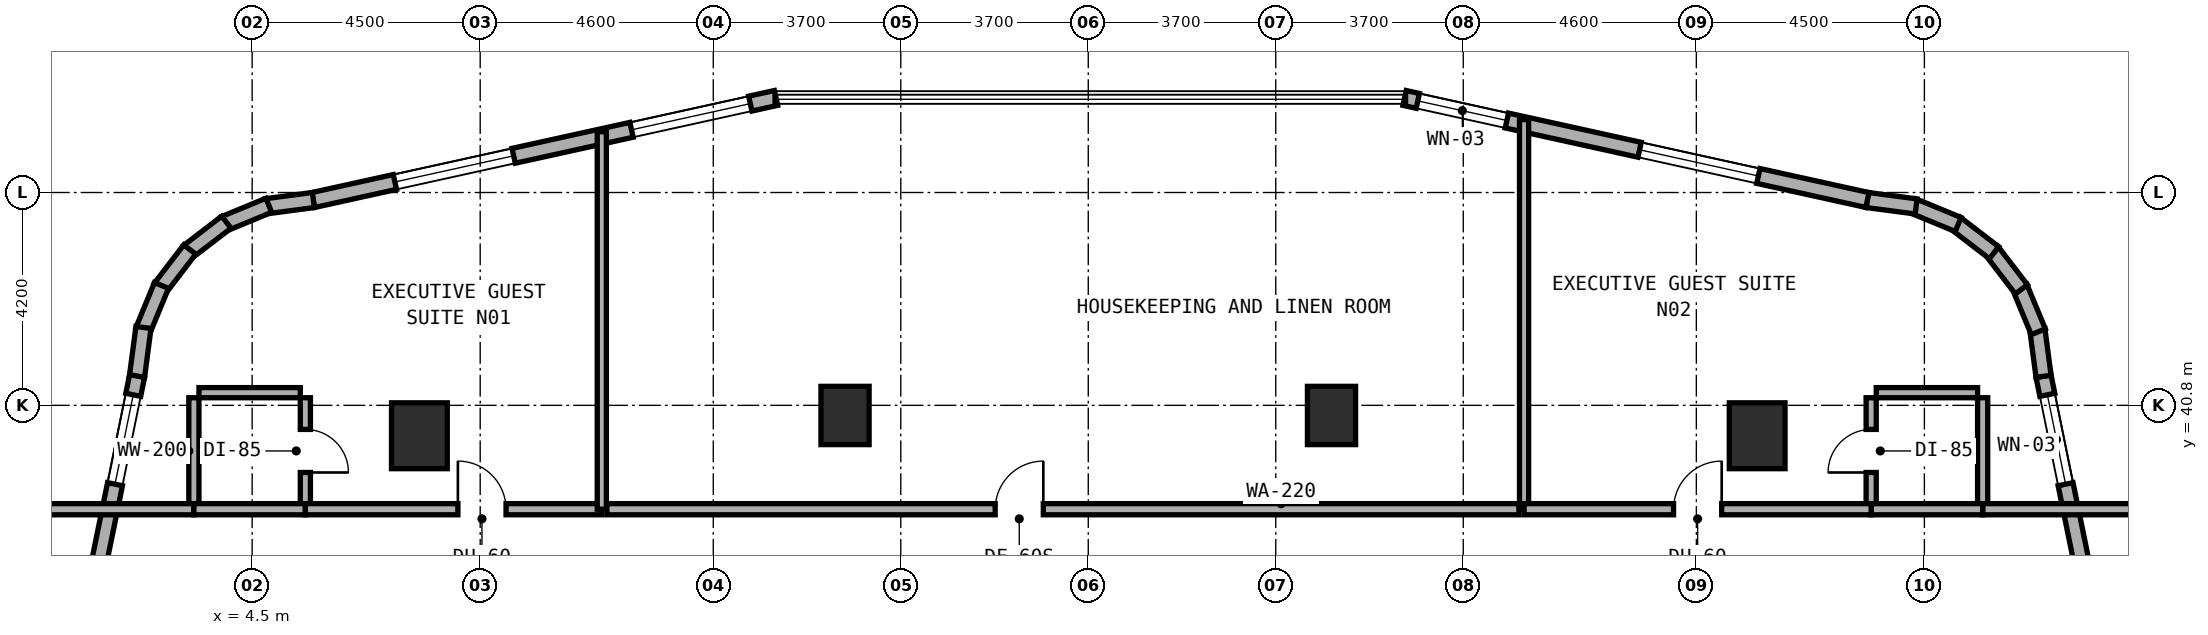
"""IFC4 building model, lengths in metres.
Left out: names, types, materials, properties, quantities, classifications, styles, units other than length and angle.
Written with IfcOpenShell. Run it as: python <this file> out.ifc"""

import sys

from ifc_helpers import new_model, si_unit, direction, frame, frame_2d, origin, origin_2d, place, context, subcontext, project, spatial, rectangle, extrude, element, fill, save


model = new_model("IFC4")
c1 = context("Model", 3, precision=1e-05, world=origin(), true_north=direction((0.0, 1.0)))
c2 = subcontext(c1, "Body", "Model", "MODEL_VIEW")
j1 = project(units=[si_unit("LENGTHUNIT", "METRE"), si_unit("PLANEANGLEUNIT", "RADIAN")], contexts=[c1])
p1 = place(None, origin())
s1 = spatial("IfcSite", under=j1, at=p1, CompositionType="ELEMENT")
p2 = place(p1, origin())
s2 = spatial("IfcBuilding", under=s1, at=p2, CompositionType="ELEMENT")
p3 = place(p2, frame((0.0, 0.0, 52.0)))
s3 = spatial("IfcBuildingStorey", under=s2, at=p3, CompositionType="ELEMENT", Elevation=52.0)
for number, where, z_axis, x_axis in (
    (1, (16.2, 40.6, 0.0), (0.0, 0.0, 1.0), (1.0, 0.0, 0.0)),
    (2, (25.8, 40.6, 0.0), (0.0, 0.0, 1.0), (1.0, 0.0, 0.0)),
):
    element("IfcColumn", number, at=place(p3, frame(where, z_axis=z_axis, x_axis=x_axis)), inside=s3, PredefinedType="COLUMN", context=c2, shape_type="SweptSolid", body=[
        extrude(rectangle(XDim=0.95, YDim=1.15, at=origin_2d()), origin(), (0.0, 0.0, 1.0), 3.5),
    ])
for number, where, z_axis, x_axis in (
    (3, (34.2, 40.2, 0.0), (0.0, 0.0, 1.0), (1.0, 0.0, 0.0)),
    (4, (7.8, 40.2, 0.0), (0.0, 0.0, 1.0), (1.0, 0.0, 0.0)),
):
    element("IfcColumn", number, at=place(p3, frame(where, z_axis=z_axis, x_axis=x_axis)), inside=s3, PredefinedType="COLUMN", context=c2, shape_type="SweptSolid", body=[
        extrude(rectangle(XDim=1.1, YDim=1.3, at=origin_2d()), origin(), (0.0, 0.0, 1.0), 3.5),
    ])
p4 = place(p3, frame((41.864, 31.516, 0.0), z_axis=(0.0, 0.0, 1.0), x_axis=(-0.199990901713, 0.979797754249, 0.0)))
e5 = element("IfcWall", 5, at=p4, inside=s3, PredefinedType="STANDARD", context=c2, shape_type="SweptSolid", body=[
    extrude(rectangle(XDim=10.065, YDim=0.3, at=frame_2d((5.033, 0.0))), origin(), (0.0, 0.0, 1.0), 3.22),
])
p5 = place(p4, frame((2.429, 0.0, 0.8)))
e6 = element("IfcOpeningElement", 6, at=p5, cuts=e5, PredefinedType="OPENING", context=c2, shape_type="SweptSolid", body=[
    extrude(rectangle(XDim=2.4, YDim=1.6, at=frame_2d((1.2, 0.8))), frame((0.0, 0.16, 0.0), z_axis=(0.0, -1.0, 0.0), x_axis=(1.0, 0.0, 0.0)), (0.0, 0.0, 1.0), 0.32),
])
p6 = place(p4, frame((7.887, 0.0, 0.85)))
e7 = element("IfcOpeningElement", 7, at=p6, cuts=e5, PredefinedType="OPENING", context=c2, shape_type="SweptSolid", body=[
    extrude(rectangle(XDim=1.8, YDim=1.5, at=frame_2d((0.9, 0.75))), frame((0.0, 0.16, 0.0), z_axis=(0.0, -1.0, 0.0), x_axis=(1.0, 0.0, 0.0)), (0.0, 0.0, 1.0), 0.32),
])
p7 = place(p3, frame((39.852, 41.372, 0.0), z_axis=(0.0, 0.0, 1.0), x_axis=(-0.131174864804, 0.991359246108, 0.0)))
e8 = element("IfcWall", 8, at=p7, inside=s3, PredefinedType="STANDARD", context=c2, shape_type="SweptSolid", body=[
    extrude(rectangle(XDim=0.938, YDim=0.3, at=frame_2d((0.469, 0.0))), origin(), (0.0, 0.0, 1.0), 3.22),
])
p8 = place(p3, frame((39.748, 42.252, 0.0), z_axis=(0.0, 0.0, 1.0), x_axis=(-0.382344263057, 0.924019948111, 0.0)))
e9 = element("IfcWall", 9, at=p8, inside=s3, PredefinedType="STANDARD", context=c2, shape_type="SweptSolid", body=[
    extrude(rectangle(XDim=0.955, YDim=0.3, at=frame_2d((0.477, 0.0))), origin(), (0.0, 0.0, 1.0), 3.22),
])
p9 = place(p3, frame((39.414, 43.089, 0.0), z_axis=(0.0, 0.0, 1.0), x_axis=(-0.608474481025, 0.793573440799, 0.0)))
e10 = element("IfcWall", 10, at=p9, inside=s3, PredefinedType="STANDARD", context=c2, shape_type="SweptSolid", body=[
    extrude(rectangle(XDim=0.955, YDim=0.3, at=frame_2d((0.478, 0.0))), origin(), (0.0, 0.0, 1.0), 3.22),
])
p10 = place(p3, frame((38.875, 43.812, 0.0), z_axis=(0.0, 0.0, 1.0), x_axis=(-0.793668068435, 0.608351047625, 0.0)))
e11 = element("IfcWall", 11, at=p10, inside=s3, PredefinedType="STANDARD", context=c2, shape_type="SweptSolid", body=[
    extrude(rectangle(XDim=0.955, YDim=0.3, at=frame_2d((0.478, 0.0))), origin(), (0.0, 0.0, 1.0), 3.22),
])
p11 = place(p3, frame((38.166, 44.369, 0.0), z_axis=(0.0, 0.0, 1.0), x_axis=(-0.924019948111, 0.382344263057, 0.0)))
e12 = element("IfcWall", 12, at=p11, inside=s3, PredefinedType="STANDARD", context=c2, shape_type="SweptSolid", body=[
    extrude(rectangle(XDim=0.955, YDim=0.3, at=frame_2d((0.477, 0.0))), origin(), (0.0, 0.0, 1.0), 3.22),
])
p12 = place(p3, frame((37.337, 44.725, 0.0), z_axis=(0.0, 0.0, 1.0), x_axis=(-0.991454295543, 0.130454512571, 0.0)))
e13 = element("IfcWall", 13, at=p12, inside=s3, PredefinedType="STANDARD", context=c2, shape_type="SweptSolid", body=[
    extrude(rectangle(XDim=0.973, YDim=0.3, at=frame_2d((0.487, 0.0))), origin(), (0.0, 0.0, 1.0), 3.22),
])
p13 = place(p3, frame((36.376, 44.852, 0.0), z_axis=(0.0, 0.0, 1.0), x_axis=(-0.97654500432, 0.215313386808, 0.0)))
e14 = element("IfcWall", 14, at=p13, inside=s3, PredefinedType="STANDARD", context=c2, shape_type="SweptSolid", body=[
    extrude(rectangle(XDim=9.354, YDim=0.3, at=frame_2d((4.677, 0.0))), origin(), (0.0, 0.0, 1.0), 3.22),
])
p14 = place(p13, frame((2.204, 0.0, 0.8)))
e15 = element("IfcOpeningElement", 15, at=p14, cuts=e14, PredefinedType="OPENING", context=c2, shape_type="SweptSolid", body=[
    extrude(rectangle(XDim=2.4, YDim=1.6, at=frame_2d((1.2, 0.8))), frame((0.0, 0.16, 0.0), z_axis=(0.0, -1.0, 0.0), x_axis=(1.0, 0.0, 0.0)), (0.0, 0.0, 1.0), 0.32),
])
p15 = place(p13, frame((7.286, 0.0, 0.85)))
e16 = element("IfcOpeningElement", 16, at=p15, cuts=e14, PredefinedType="OPENING", context=c2, shape_type="SweptSolid", body=[
    extrude(rectangle(XDim=1.8, YDim=1.5, at=frame_2d((0.9, 0.75))), frame((0.0, 0.16, 0.0), z_axis=(0.0, -1.0, 0.0), x_axis=(1.0, 0.0, 0.0)), (0.0, 0.0, 1.0), 0.32),
])
p16 = place(p3, frame((14.838, 46.866, 0.0), z_axis=(0.0, 0.0, 1.0), x_axis=(-0.9765437942, -0.215318875183, 0.0)))
e17 = element("IfcWall", 17, at=p16, inside=s3, PredefinedType="STANDARD", context=c2, shape_type="SweptSolid", body=[
    extrude(rectangle(XDim=9.353, YDim=0.3, at=frame_2d((4.677, 0.0))), origin(), (0.0, 0.0, 1.0), 3.22),
])
p17 = place(p16, frame((0.52, 0.0, 0.8)))
e18 = element("IfcOpeningElement", 18, at=p17, cuts=e17, PredefinedType="OPENING", context=c2, shape_type="SweptSolid", body=[
    extrude(rectangle(XDim=2.4, YDim=1.6, at=frame_2d((1.2, 0.8))), frame((0.0, 0.16, 0.0), z_axis=(0.0, -1.0, 0.0), x_axis=(1.0, 0.0, 0.0)), (0.0, 0.0, 1.0), 0.32),
])
p18 = place(p16, frame((5.302, 0.0, 0.8)))
e19 = element("IfcOpeningElement", 19, at=p18, cuts=e17, PredefinedType="OPENING", context=c2, shape_type="SweptSolid", body=[
    extrude(rectangle(XDim=2.4, YDim=1.6, at=frame_2d((1.2, 0.8))), frame((0.0, 0.16, 0.0), z_axis=(0.0, -1.0, 0.0), x_axis=(1.0, 0.0, 0.0)), (0.0, 0.0, 1.0), 0.32),
])
p19 = place(p3, frame((5.708, 44.852, 0.0), z_axis=(0.0, 0.0, 1.0), x_axis=(-0.991359246108, -0.131174864804, 0.0)))
e20 = element("IfcWall", 20, at=p19, inside=s3, PredefinedType="STANDARD", context=c2, shape_type="SweptSolid", body=[
    extrude(rectangle(XDim=0.938, YDim=0.3, at=frame_2d((0.469, 0.0))), origin(), (0.0, 0.0, 1.0), 3.22),
])
p20 = place(p3, frame((4.828, 44.748, 0.0), z_axis=(0.0, 0.0, 1.0), x_axis=(-0.923982547689, -0.382434636986, 0.0)))
e21 = element("IfcWall", 21, at=p20, inside=s3, PredefinedType="STANDARD", context=c2, shape_type="SweptSolid", body=[
    extrude(rectangle(XDim=0.954, YDim=0.3, at=frame_2d((0.477, 0.0))), origin(), (0.0, 0.0, 1.0), 3.22),
])
for number, where, z_axis, x_axis in (
    (22, (3.991, 44.414, 0.0), (0.0, 0.0, 1.0), (-0.794, -0.608, 0.0)),
    (23, (3.268, 43.875, 0.0), (0.0, 0.0, 1.0), (-0.608, -0.794, 0.0)),
):
    element("IfcWall", number, at=place(p3, frame(where, z_axis=z_axis, x_axis=x_axis)), inside=s3, PredefinedType="STANDARD", context=c2, shape_type="SweptSolid", body=[
        extrude(rectangle(XDim=0.955, YDim=0.3, at=frame_2d((0.478, 0.0))), origin(), (0.0, 0.0, 1.0), 3.22),
    ])
p21 = place(p3, frame((2.711, 43.166, 0.0), z_axis=(0.0, 0.0, 1.0), x_axis=(-0.382344263057, -0.924019948111, 0.0)))
e24 = element("IfcWall", 24, at=p21, inside=s3, PredefinedType="STANDARD", context=c2, shape_type="SweptSolid", body=[
    extrude(rectangle(XDim=0.955, YDim=0.3, at=frame_2d((0.477, 0.0))), origin(), (0.0, 0.0, 1.0), 3.22),
])
p22 = place(p3, frame((2.355, 42.337, 0.0), z_axis=(0.0, 0.0, 1.0), x_axis=(-0.130454512571, -0.991454295543, 0.0)))
e25 = element("IfcWall", 25, at=p22, inside=s3, PredefinedType="STANDARD", context=c2, shape_type="SweptSolid", body=[
    extrude(rectangle(XDim=0.973, YDim=0.3, at=frame_2d((0.487, 0.0))), origin(), (0.0, 0.0, 1.0), 3.22),
])
p23 = place(p3, frame((2.229, 41.378, 0.0), z_axis=(0.0, 0.0, 1.0), x_axis=(-0.199990901713, -0.979797754249, 0.0)))
e26 = element("IfcWall", 26, at=p23, inside=s3, PredefinedType="STANDARD", context=c2, shape_type="SweptSolid", body=[
    extrude(rectangle(XDim=10.065, YDim=0.3, at=frame_2d((5.033, 0.0))), origin(), (0.0, 0.0, 1.0), 3.22),
])
p24 = place(p23, frame((0.378, 0.0, 0.85)))
e27 = element("IfcOpeningElement", 27, at=p24, cuts=e26, PredefinedType="OPENING", context=c2, shape_type="SweptSolid", body=[
    extrude(rectangle(XDim=1.8, YDim=1.5, at=frame_2d((0.9, 0.75))), frame((0.0, 0.16, 0.0), z_axis=(0.0, -1.0, 0.0), x_axis=(1.0, 0.0, 0.0)), (0.0, 0.0, 1.0), 0.32),
])
p25 = place(p23, frame((5.236, 0.0, 0.8)))
e28 = element("IfcOpeningElement", 28, at=p25, cuts=e26, PredefinedType="OPENING", context=c2, shape_type="SweptSolid", body=[
    extrude(rectangle(XDim=2.4, YDim=1.6, at=frame_2d((1.2, 0.8))), frame((0.0, 0.16, 0.0), z_axis=(0.0, -1.0, 0.0), x_axis=(1.0, 0.0, 0.0)), (0.0, 0.0, 1.0), 0.32),
])
p26 = place(p3, frame((5.55, 38.85, 0.0), z_axis=(0.0, 0.0, 1.0), x_axis=(0.0, 1.0, 0.0)))
e29 = element("IfcWall", 29, at=p26, inside=s3, PredefinedType="PLUMBINGWALL", context=c2, shape_type="SweptSolid", body=[
    extrude(rectangle(XDim=2.1, YDim=0.2, at=frame_2d((1.05, 0.0))), origin(), (0.0, 0.0, 1.0), 3.22),
])
p27 = place(p26, frame((0.625, 0.0, 0.0)))
e30 = element("IfcOpeningElement", 30, at=p27, cuts=e29, PredefinedType="OPENING", context=c2, shape_type="SweptSolid", body=[
    extrude(rectangle(XDim=0.85, YDim=2.1, at=frame_2d((0.425, 1.05))), frame((0.0, 0.11, 0.0), z_axis=(0.0, -1.0, 0.0), x_axis=(1.0, 0.0, 0.0)), (0.0, 0.0, 1.0), 0.22),
])
p28 = place(p3, frame((3.45, 41.05, 0.0), z_axis=(0.0, 0.0, 1.0), x_axis=(1.0, 0.0, 0.0)))
e31 = element("IfcWall", 31, at=p28, inside=s3, PredefinedType="PLUMBINGWALL", context=c2, shape_type="SweptSolid", body=[
    extrude(rectangle(XDim=2.0, YDim=0.2, at=frame_2d((1.0, 0.0))), origin(), (0.0, 0.0, 1.0), 3.22),
])
p29 = place(p3, frame((3.35, 38.85, 0.0), z_axis=(0.0, 0.0, 1.0), x_axis=(0.0, 1.0, 0.0)))
e32 = element("IfcWall", 32, at=p29, inside=s3, PredefinedType="PLUMBINGWALL", context=c2, shape_type="SweptSolid", body=[
    extrude(rectangle(XDim=2.1, YDim=0.2, at=frame_2d((1.05, 0.0))), origin(), (0.0, 0.0, 1.0), 3.22),
])
p30 = place(p3, frame((0.24, 38.75, 0.0), z_axis=(0.0, 0.0, 1.0), x_axis=(1.0, 0.0, 0.0)))
e33 = element("IfcWall", 33, at=p30, inside=s3, PredefinedType="SOLIDWALL", context=c2, shape_type="SweptSolid", body=[
    extrude(rectangle(XDim=3.11, YDim=0.22, at=frame_2d((1.555, 0.0))), origin(), (0.0, 0.0, 1.0), 3.22),
])
p31 = place(p3, frame((3.35, 38.75, 0.0), z_axis=(0.0, 0.0, 1.0), x_axis=(1.0, 0.0, 0.0)))
e34 = element("IfcWall", 34, at=p31, inside=s3, PredefinedType="SOLIDWALL", context=c2, shape_type="SweptSolid", body=[
    extrude(rectangle(XDim=2.2, YDim=0.22, at=frame_2d((1.1, 0.0))), origin(), (0.0, 0.0, 1.0), 3.22),
])
p32 = place(p3, frame((5.55, 38.75, 0.0), z_axis=(0.0, 0.0, 1.0), x_axis=(1.0, 0.0, 0.0)))
e35 = element("IfcWall", 35, at=p32, inside=s3, PredefinedType="SOLIDWALL", context=c2, shape_type="SweptSolid", body=[
    extrude(rectangle(XDim=5.85, YDim=0.22, at=frame_2d((2.925, 0.0))), origin(), (0.0, 0.0, 1.0), 2.395),
])
p33 = place(p32, frame((3.01, 0.0, 0.0)))
e36 = element("IfcOpeningElement", 36, at=p33, cuts=e35, PredefinedType="OPENING", context=c2, shape_type="SweptSolid", body=[
    extrude(rectangle(XDim=0.95, YDim=2.1, at=frame_2d((0.475, 1.05))), frame((0.0, 0.12, 0.0), z_axis=(0.0, -1.0, 0.0), x_axis=(1.0, 0.0, 0.0)), (0.0, 0.0, 1.0), 0.24),
])
p34 = place(p3, frame((11.4, 38.75, 0.0), z_axis=(0.0, 0.0, 1.0), x_axis=(0.0, 1.0, 0.0)))
e37 = element("IfcWall", 37, at=p34, inside=s3, PredefinedType="SOLIDWALL", context=c2, shape_type="SweptSolid", body=[
    extrude(rectangle(XDim=7.45, YDim=0.18, at=frame_2d((3.725, 0.0))), origin(), (0.0, 0.0, 1.0), 2.745),
])
p35 = place(p3, frame((11.5, 38.75, 0.0), z_axis=(0.0, 0.0, 1.0), x_axis=(1.0, 0.0, 0.0)))
e38 = element("IfcWall", 38, at=p35, inside=s3, PredefinedType="SOLIDWALL", context=c2, shape_type="SweptSolid", body=[
    extrude(rectangle(XDim=18.0, YDim=0.22, at=frame_2d((9.0, 0.0))), origin(), (0.0, 0.0, 1.0), 2.395),
])
p36 = place(p35, frame((7.663, 0.0, 0.0)))
e39 = element("IfcOpeningElement", 39, at=p36, cuts=e38, PredefinedType="OPENING", context=c2, shape_type="SweptSolid", body=[
    extrude(rectangle(XDim=0.95, YDim=2.1, at=frame_2d((0.475, 1.05))), frame((0.0, 0.12, 0.0), z_axis=(0.0, -1.0, 0.0), x_axis=(1.0, 0.0, 0.0)), (0.0, 0.0, 1.0), 0.24),
])
p37 = place(p3, frame((29.6, 38.75, 0.0), z_axis=(0.0, 0.0, 1.0), x_axis=(0.0, 1.0, 0.0)))
e40 = element("IfcWall", 40, at=p37, inside=s3, PredefinedType="SOLIDWALL", context=c2, shape_type="SweptSolid", body=[
    extrude(rectangle(XDim=7.688, YDim=0.18, at=frame_2d((3.844, 0.0))), origin(), (0.0, 0.0, 1.0), 2.745),
])
p38 = place(p3, frame((36.45, 38.85, 0.0), z_axis=(0.0, 0.0, 1.0), x_axis=(0.0, 1.0, 0.0)))
e41 = element("IfcWall", 41, at=p38, inside=s3, PredefinedType="PLUMBINGWALL", context=c2, shape_type="SweptSolid", body=[
    extrude(rectangle(XDim=2.1, YDim=0.2, at=frame_2d((1.05, 0.0))), origin(), (0.0, 0.0, 1.0), 3.22),
])
p39 = place(p38, frame((0.625, 0.0, 0.0)))
e42 = element("IfcOpeningElement", 42, at=p39, cuts=e41, PredefinedType="OPENING", context=c2, shape_type="SweptSolid", body=[
    extrude(rectangle(XDim=0.85, YDim=2.1, at=frame_2d((0.425, 1.05))), frame((0.0, 0.11, 0.0), z_axis=(0.0, -1.0, 0.0), x_axis=(1.0, 0.0, 0.0)), (0.0, 0.0, 1.0), 0.22),
])
p40 = place(p3, frame((36.55, 41.05, 0.0), z_axis=(0.0, 0.0, 1.0), x_axis=(1.0, 0.0, 0.0)))
e43 = element("IfcWall", 43, at=p40, inside=s3, PredefinedType="PLUMBINGWALL", context=c2, shape_type="SweptSolid", body=[
    extrude(rectangle(XDim=2.0, YDim=0.2, at=frame_2d((1.0, 0.0))), origin(), (0.0, 0.0, 1.0), 3.22),
])
p41 = place(p3, frame((38.65, 38.85, 0.0), z_axis=(0.0, 0.0, 1.0), x_axis=(0.0, 1.0, 0.0)))
e44 = element("IfcWall", 44, at=p41, inside=s3, PredefinedType="PLUMBINGWALL", context=c2, shape_type="SweptSolid", body=[
    extrude(rectangle(XDim=2.1, YDim=0.2, at=frame_2d((1.05, 0.0))), origin(), (0.0, 0.0, 1.0), 3.22),
])
p42 = place(p3, frame((38.65, 38.75, 0.0), z_axis=(0.0, 0.0, 1.0), x_axis=(1.0, 0.0, 0.0)))
e45 = element("IfcWall", 45, at=p42, inside=s3, PredefinedType="SOLIDWALL", context=c2, shape_type="SweptSolid", body=[
    extrude(rectangle(XDim=3.19, YDim=0.22, at=frame_2d((1.595, 0.0))), origin(), (0.0, 0.0, 1.0), 3.22),
])
p43 = place(p3, frame((36.45, 38.75, 0.0), z_axis=(0.0, 0.0, 1.0), x_axis=(1.0, 0.0, 0.0)))
e46 = element("IfcWall", 46, at=p43, inside=s3, PredefinedType="SOLIDWALL", context=c2, shape_type="SweptSolid", body=[
    extrude(rectangle(XDim=2.2, YDim=0.22, at=frame_2d((1.1, 0.0))), origin(), (0.0, 0.0, 1.0), 3.22),
])
p44 = place(p3, frame((29.6, 38.75, 0.0), z_axis=(0.0, 0.0, 1.0), x_axis=(1.0, 0.0, 0.0)))
e47 = element("IfcWall", 47, at=p44, inside=s3, PredefinedType="SOLIDWALL", context=c2, shape_type="SweptSolid", body=[
    extrude(rectangle(XDim=6.85, YDim=0.22, at=frame_2d((3.425, 0.0))), origin(), (0.0, 0.0, 1.0), 2.395),
])
p45 = place(p44, frame((2.95, 0.0, 0.0)))
e48 = element("IfcOpeningElement", 48, at=p45, cuts=e47, PredefinedType="OPENING", context=c2, shape_type="SweptSolid", body=[
    extrude(rectangle(XDim=0.95, YDim=2.1, at=frame_2d((0.475, 1.05))), frame((0.0, 0.12, 0.0), z_axis=(0.0, -1.0, 0.0), x_axis=(1.0, 0.0, 0.0)), (0.0, 0.0, 1.0), 0.24),
])
p46 = place(p6, origin())
e49 = element("IfcWindow", 49, at=p46, inside=s3, PartitioningType="SINGLE_PANEL", PredefinedType="WINDOW", context=c2, shape_type="SweptSolid", body=[
    extrude(rectangle(XDim=1.8, YDim=1.5, at=frame_2d((0.9, 0.75))), frame((0.0, 0.03, 0.0), z_axis=(0.0, -1.0, 0.0), x_axis=(1.0, 0.0, 0.0)), (0.0, 0.0, 1.0), 0.06),
])
fill(e7, e49)
p47 = place(p14, origin())
e50 = element("IfcWindow", 50, at=p47, inside=s3, PartitioningType="SINGLE_PANEL", PredefinedType="WINDOW", context=c2, shape_type="SweptSolid", body=[
    extrude(rectangle(XDim=2.4, YDim=1.6, at=frame_2d((1.2, 0.8))), frame((0.0, 0.03, 0.0), z_axis=(0.0, -1.0, 0.0), x_axis=(1.0, 0.0, 0.0)), (0.0, 0.0, 1.0), 0.06),
])
fill(e15, e50)
p48 = place(p15, origin())
e51 = element("IfcWindow", 51, at=p48, inside=s3, PartitioningType="SINGLE_PANEL", PredefinedType="WINDOW", context=c2, shape_type="SweptSolid", body=[
    extrude(rectangle(XDim=1.8, YDim=1.5, at=frame_2d((0.9, 0.75))), frame((0.0, 0.03, 0.0), z_axis=(0.0, -1.0, 0.0), x_axis=(1.0, 0.0, 0.0)), (0.0, 0.0, 1.0), 0.06),
])
fill(e16, e51)
p49 = place(p17, origin())
e52 = element("IfcWindow", 52, at=p49, inside=s3, PartitioningType="SINGLE_PANEL", PredefinedType="WINDOW", context=c2, shape_type="SweptSolid", body=[
    extrude(rectangle(XDim=2.4, YDim=1.6, at=frame_2d((1.2, 0.8))), frame((0.0, 0.03, 0.0), z_axis=(0.0, -1.0, 0.0), x_axis=(1.0, 0.0, 0.0)), (0.0, 0.0, 1.0), 0.06),
])
fill(e18, e52)
p50 = place(p18, origin())
e53 = element("IfcWindow", 53, at=p50, inside=s3, PartitioningType="SINGLE_PANEL", PredefinedType="WINDOW", context=c2, shape_type="SweptSolid", body=[
    extrude(rectangle(XDim=2.4, YDim=1.6, at=frame_2d((1.2, 0.8))), frame((0.0, 0.03, 0.0), z_axis=(0.0, -1.0, 0.0), x_axis=(1.0, 0.0, 0.0)), (0.0, 0.0, 1.0), 0.06),
])
fill(e19, e53)
p51 = place(p24, origin())
e54 = element("IfcWindow", 54, at=p51, inside=s3, PartitioningType="SINGLE_PANEL", PredefinedType="WINDOW", context=c2, shape_type="SweptSolid", body=[
    extrude(rectangle(XDim=1.8, YDim=1.5, at=frame_2d((0.9, 0.75))), frame((0.0, 0.03, 0.0), z_axis=(0.0, -1.0, 0.0), x_axis=(1.0, 0.0, 0.0)), (0.0, 0.0, 1.0), 0.06),
])
fill(e27, e54)
p52 = place(p27, frame((0.85, 0.0, 0.0), z_axis=(0.0, 0.0, 1.0), x_axis=(-1.0, 0.0, 0.0)))
e55 = element("IfcDoor", 55, at=p52, inside=s3, OperationType="SINGLE_SWING_RIGHT", PredefinedType="DOOR", context=c2, shape_type="SweptSolid", body=[
    extrude(rectangle(XDim=0.85, YDim=2.1, at=frame_2d((0.425, 1.05))), frame((0.0, 0.025, 0.0), z_axis=(0.0, -1.0, 0.0), x_axis=(1.0, 0.0, 0.0)), (0.0, 0.0, 1.0), 0.05),
])
fill(e30, e55)
p53 = place(p33, origin())
e56 = element("IfcDoor", 56, at=p53, inside=s3, OperationType="SINGLE_SWING_LEFT", PredefinedType="DOOR", context=c2, shape_type="SweptSolid", body=[
    extrude(rectangle(XDim=0.95, YDim=2.1, at=frame_2d((0.475, 1.05))), frame((0.0, 0.025, 0.0), z_axis=(0.0, -1.0, 0.0), x_axis=(1.0, 0.0, 0.0)), (0.0, 0.0, 1.0), 0.05),
])
fill(e36, e56)
p54 = place(p36, origin())
e57 = element("IfcDoor", 57, at=p54, inside=s3, OperationType="SINGLE_SWING_RIGHT", PredefinedType="DOOR", context=c2, shape_type="SweptSolid", body=[
    extrude(rectangle(XDim=0.95, YDim=2.1, at=frame_2d((0.475, 1.05))), frame((0.0, 0.025, 0.0), z_axis=(0.0, -1.0, 0.0), x_axis=(1.0, 0.0, 0.0)), (0.0, 0.0, 1.0), 0.05),
])
fill(e39, e57)
p55 = place(p39, origin())
e58 = element("IfcDoor", 58, at=p55, inside=s3, OperationType="SINGLE_SWING_LEFT", PredefinedType="DOOR", context=c2, shape_type="SweptSolid", body=[
    extrude(rectangle(XDim=0.85, YDim=2.1, at=frame_2d((0.425, 1.05))), frame((0.0, 0.025, 0.0), z_axis=(0.0, -1.0, 0.0), x_axis=(1.0, 0.0, 0.0)), (0.0, 0.0, 1.0), 0.05),
])
fill(e42, e58)
p56 = place(p45, origin())
e59 = element("IfcDoor", 59, at=p56, inside=s3, OperationType="SINGLE_SWING_RIGHT", PredefinedType="DOOR", context=c2, shape_type="SweptSolid", body=[
    extrude(rectangle(XDim=0.95, YDim=2.1, at=frame_2d((0.475, 1.05))), frame((0.0, 0.025, 0.0), z_axis=(0.0, -1.0, 0.0), x_axis=(1.0, 0.0, 0.0)), (0.0, 0.0, 1.0), 0.05),
])
fill(e48, e59)
save(model, sys.argv[1])
